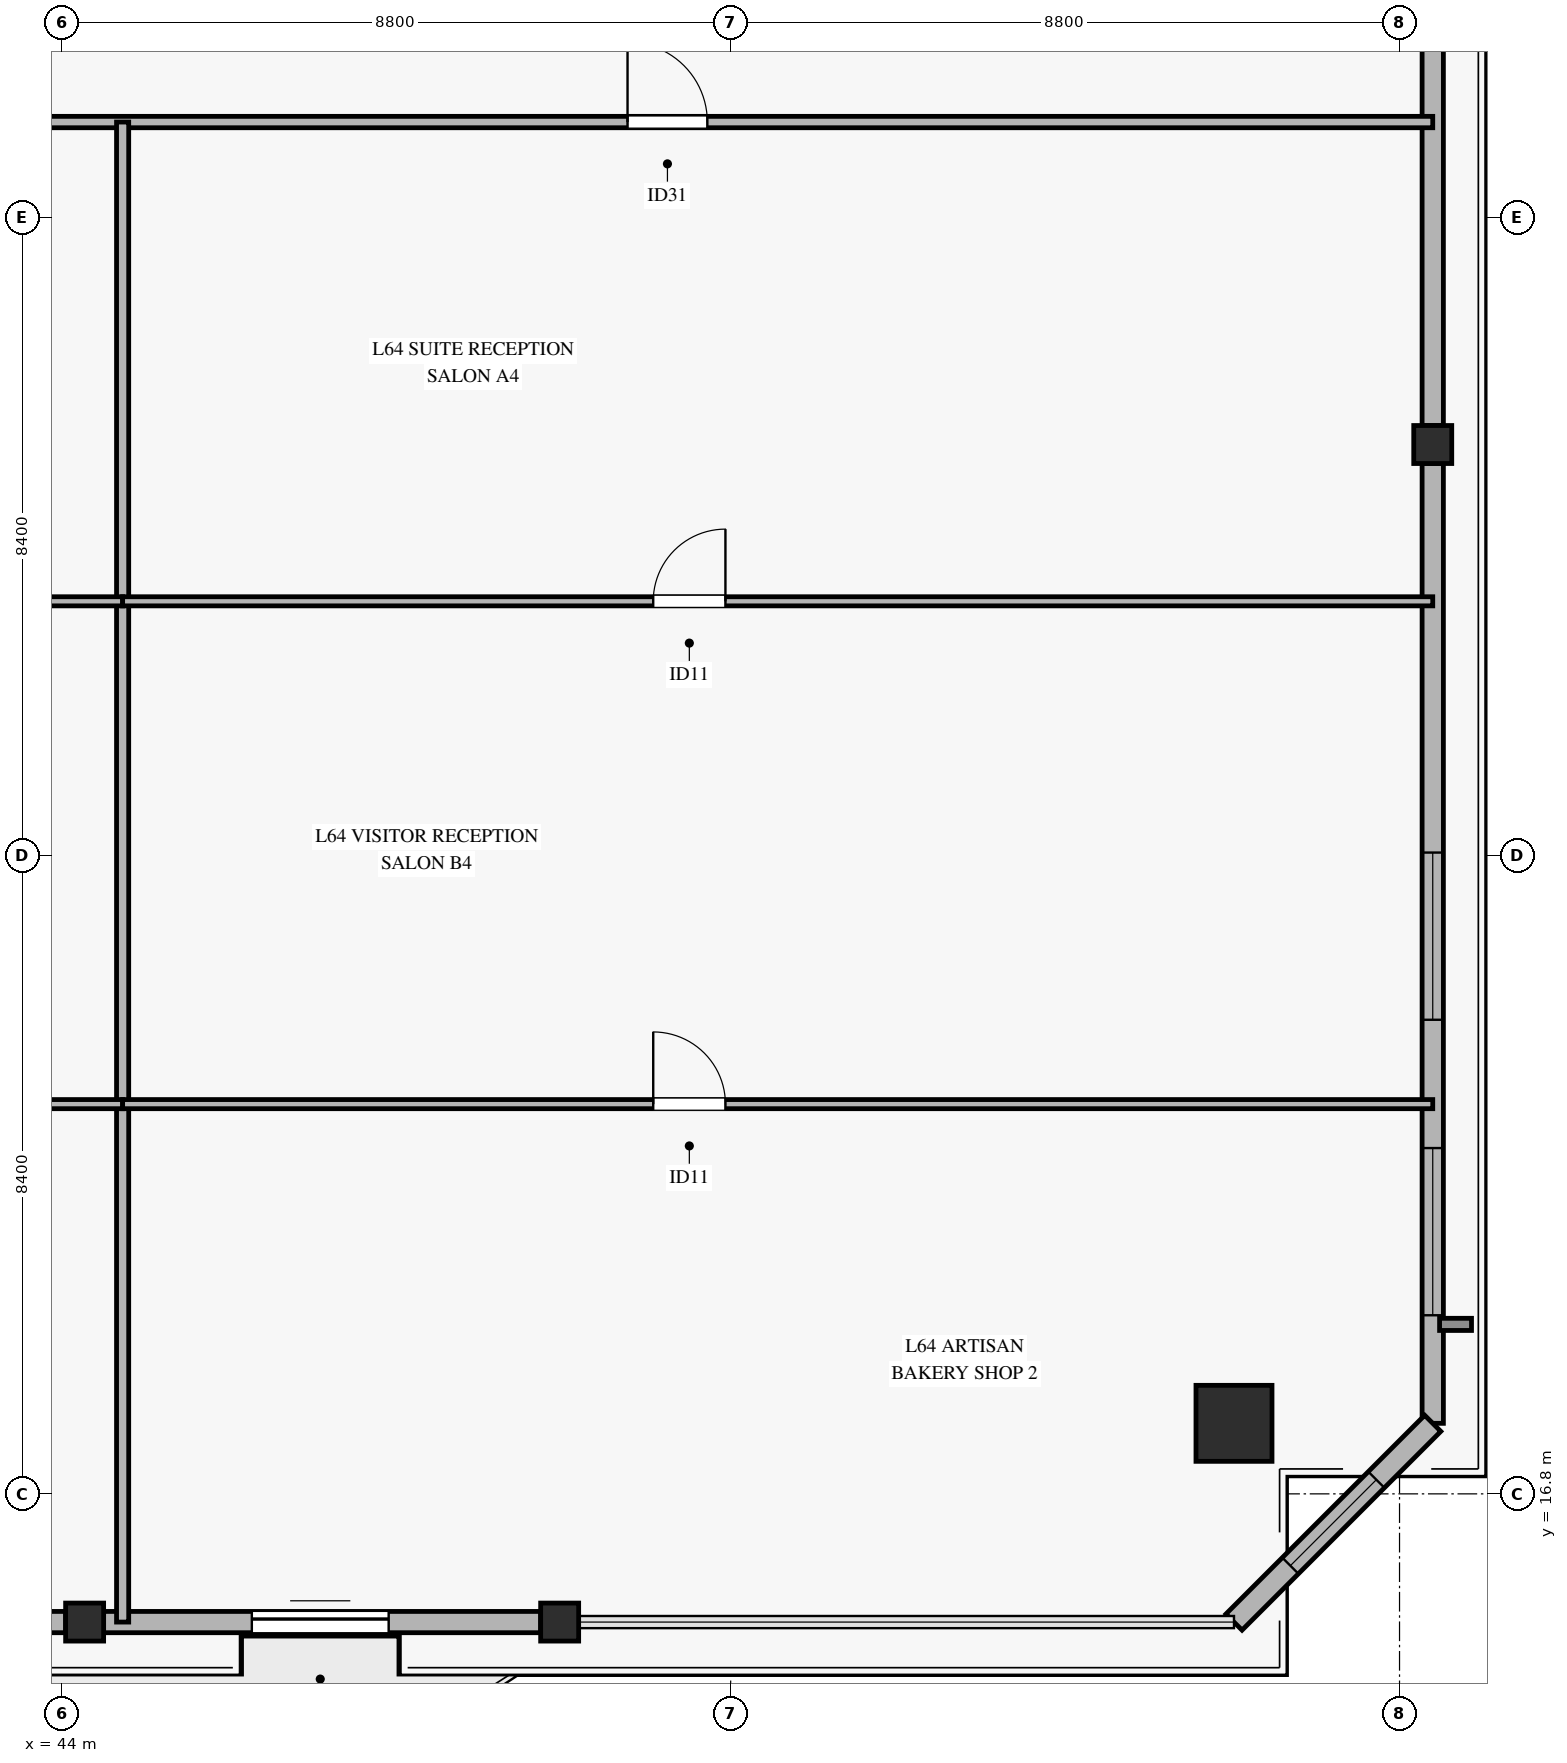
"""IFC4 building model, lengths in metres.
Left out: names, types, materials, properties, quantities, classifications, styles, units other than length and angle.
Written with IfcOpenShell. Run it as: python <this file> out.ifc"""

import sys

from ifc_helpers import new_model, si_unit, direction, frame, frame_2d, origin, origin_2d, place, context, subcontext, project, spatial, rectangle, hollow_rectangle, extrude, source, transform, mapped, element, fill, save


model = new_model("IFC4")
c1 = context("Model", 3, precision=1e-05, world=origin(), true_north=direction((0.0, 1.0)))
c2 = subcontext(c1, "Body", "Model", "MODEL_VIEW")
j1 = project(units=[si_unit("LENGTHUNIT", "METRE"), si_unit("PLANEANGLEUNIT", "RADIAN")], contexts=[c1])
p1 = place(None, origin())
s1 = spatial("IfcSite", under=j1, at=p1, CompositionType="ELEMENT")
p2 = place(p1, origin())
s2 = spatial("IfcBuilding", under=s1, at=p2, CompositionType="ELEMENT")
p3 = place(p2, frame((0.0, 0.0, 251.9)))
s3 = spatial("IfcBuildingStorey", under=s2, at=p3, CompositionType="ELEMENT", Elevation=251.9)
m1 = source(origin(), c2, "Body", "SweptSolid", [
    extrude(hollow_rectangle(XDim=1.0, YDim=1.0, WallThickness=0.045, at=origin_2d()), origin(), (0.0, 0.0, 1.0), 3.185),
])
p4 = place(p3, frame((59.422, 17.728, 0.0), z_axis=(0.0, 0.0, 1.0), x_axis=(1.0, 0.0, 0.0)))
e1 = element("IfcColumn", 1, at=p4, inside=s3, PredefinedType="COLUMN", context=c2, shape_type="MappedRepresentation", body=[
    mapped(m1, transform((0.0, 0.0, 0.0), x_axis=(1.0, 0.0, 0.0), y_axis=(0.0, 1.0, 0.0), z_axis=(0.0, 0.0, 1.0), scale=1.0)),
])
m2 = source(origin(), c2, "Body", "SweptSolid", [
    extrude(hollow_rectangle(XDim=0.5, YDim=0.5, WallThickness=0.024, at=origin_2d()), origin(), (0.0, 0.0, 1.0), 3.185),
])
for number, where, z_axis, x_axis in (
    (2, (44.3, 15.113, 0.0), (0.0, 0.0, 1.0), (1.0, 0.0, 0.0)),
    (3, (50.55, 15.113, 0.0), (0.0, 0.0, 1.0), (1.0, 0.0, 0.0)),
    (4, (62.037, 30.607, 0.0), (0.0, 0.0, 1.0), (1.0, 0.0, 0.0)),
):
    element("IfcColumn", number, at=place(p3, frame(where, z_axis=z_axis, x_axis=x_axis)), inside=s3, PredefinedType="COLUMN", context=c2, shape_type="MappedRepresentation", body=[
        mapped(m2, transform((0.0, 0.0, 0.0), x_axis=(1.0, 0.0, 0.0), y_axis=(0.0, 1.0, 0.0), z_axis=(0.0, 0.0, 1.0), scale=1.0)),
    ])
p5 = place(p3, frame((37.8, 15.113, 0.0), z_axis=(0.0, 0.0, 1.0), x_axis=(1.0, 0.0, 0.0)))
e5 = element("IfcWall", 5, at=p5, inside=s3, PredefinedType="SOLIDWALL", context=c2, shape_type="SweptSolid", body=[
    extrude(rectangle(XDim=6.25, YDim=0.28, at=frame_2d((3.125, 0.0))), origin(), (0.0, 0.0, 1.0), 2.815),
])
p6 = place(p3, frame((44.55, 15.113, 0.0), z_axis=(0.0, 0.0, 1.0), x_axis=(1.0, 0.0, 0.0)))
e6 = element("IfcWall", 6, at=p6, inside=s3, PredefinedType="SOLIDWALL", context=c2, shape_type="SweptSolid", body=[
    extrude(rectangle(XDim=5.75, YDim=0.28, at=frame_2d((2.875, 0.0))), origin(), (0.0, 0.0, 1.0), 2.815),
])
p7 = place(p6, frame((1.95, 0.0, 0.0)))
e7 = element("IfcOpeningElement", 7, at=p7, cuts=e6, PredefinedType="OPENING", context=c2, shape_type="SweptSolid", body=[
    extrude(rectangle(XDim=1.8, YDim=2.25, at=frame_2d((0.9, 1.125))), frame((0.0, 0.15, 0.0), z_axis=(0.0, -1.0, 0.0), x_axis=(1.0, 0.0, 0.0)), (0.0, 0.0, 1.0), 0.3),
])
p8 = place(p3, frame((62.037, 17.728, 0.0), z_axis=(0.0, 0.0, 1.0), x_axis=(0.0, 1.0, 0.0)))
e8 = element("IfcWall", 8, at=p8, inside=s3, PredefinedType="SOLIDWALL", context=c2, shape_type="SweptSolid", body=[
    extrude(rectangle(XDim=12.629, YDim=0.28, at=frame_2d((6.314, 0.0))), origin(), (0.0, 0.0, 1.0), 2.815),
])
p9 = place(p8, frame((1.422, 0.0, 0.45)))
e9 = element("IfcOpeningElement", 9, at=p9, cuts=e8, PredefinedType="OPENING", context=c2, shape_type="SweptSolid", body=[
    extrude(rectangle(XDim=2.2, YDim=2.1, at=frame_2d((1.1, 1.05))), frame((0.0, 0.15, 0.0), z_axis=(0.0, -1.0, 0.0), x_axis=(1.0, 0.0, 0.0)), (0.0, 0.0, 1.0), 0.3),
])
p10 = place(p8, frame((5.31, 0.0, 0.45)))
e10 = element("IfcOpeningElement", 10, at=p10, cuts=e8, PredefinedType="OPENING", context=c2, shape_type="SweptSolid", body=[
    extrude(rectangle(XDim=2.2, YDim=2.1, at=frame_2d((1.1, 1.05))), frame((0.0, 0.15, 0.0), z_axis=(0.0, -1.0, 0.0), x_axis=(1.0, 0.0, 0.0)), (0.0, 0.0, 1.0), 0.3),
])
p11 = place(p3, frame((62.037, 30.857, 0.0), z_axis=(0.0, 0.0, 1.0), x_axis=(0.0, 1.0, 0.0)))
e11 = element("IfcWall", 11, at=p11, inside=s3, PredefinedType="SOLIDWALL", context=c2, shape_type="SweptSolid", body=[
    extrude(rectangle(XDim=12.628, YDim=0.28, at=frame_2d((6.314, 0.0))), origin(), (0.0, 0.0, 1.0), 2.815),
])
p12 = place(p11, frame((7.583, 0.0, 0.45)))
e12 = element("IfcOpeningElement", 12, at=p12, cuts=e11, PredefinedType="OPENING", context=c2, shape_type="SweptSolid", body=[
    extrude(rectangle(XDim=2.2, YDim=2.1, at=frame_2d((1.1, 1.05))), frame((0.0, 0.15, 0.0), z_axis=(0.0, -1.0, 0.0), x_axis=(1.0, 0.0, 0.0)), (0.0, 0.0, 1.0), 0.3),
])
p13 = place(p3, frame((59.422, 15.113, 0.0), z_axis=(0.0, 0.0, 1.0), x_axis=(0.707106781187, 0.707106781187, 0.0)))
e13 = element("IfcWall", 13, at=p13, inside=s3, PredefinedType="SOLIDWALL", context=c2, shape_type="SweptSolid", body=[
    extrude(rectangle(XDim=3.698, YDim=0.3, at=frame_2d((1.849, 0.0))), origin(), (0.0, 0.0, 1.0), 2.815),
])
p14 = place(p13, frame((1.049, 0.0, 0.45)))
e14 = element("IfcOpeningElement", 14, at=p14, cuts=e13, PredefinedType="OPENING", context=c2, shape_type="SweptSolid", body=[
    extrude(rectangle(XDim=1.6, YDim=2.0, at=frame_2d((0.8, 1.0))), frame((0.0, 0.16, 0.0), z_axis=(0.0, -1.0, 0.0), x_axis=(1.0, 0.0, 0.0)), (0.0, 0.0, 1.0), 0.32),
])
p15 = place(p3, frame((8.364, 34.85, 0.0), z_axis=(0.0, 0.0, 1.0), x_axis=(1.0, 0.0, 0.0)))
e15 = element("IfcWall", 15, at=p15, inside=s3, PredefinedType="PARTITIONING", context=c2, shape_type="SweptSolid", body=[
    extrude(rectangle(XDim=53.673, YDim=0.15, at=frame_2d((26.836, 0.0))), origin(), (0.0, 0.0, 1.0), 2.47),
])
p16 = place(p15, frame((5.095, 0.0, 0.0)))
e16 = element("IfcOpeningElement", 16, at=p16, cuts=e15, PredefinedType="OPENING", context=c2, shape_type="SweptSolid", body=[
    extrude(rectangle(XDim=1.05, YDim=2.15, at=frame_2d((0.525, 1.075))), frame((0.0, 0.085, 0.0), z_axis=(0.0, -1.0, 0.0), x_axis=(1.0, 0.0, 0.0)), (0.0, 0.0, 1.0), 0.17),
])
p17 = place(p15, frame((17.517, 0.0, 0.0)))
e17 = element("IfcOpeningElement", 17, at=p17, cuts=e15, PredefinedType="OPENING", context=c2, shape_type="SweptSolid", body=[
    extrude(rectangle(XDim=1.05, YDim=2.15, at=frame_2d((0.525, 1.075))), frame((0.0, 0.085, 0.0), z_axis=(0.0, -1.0, 0.0), x_axis=(1.0, 0.0, 0.0)), (0.0, 0.0, 1.0), 0.17),
])
p18 = place(p15, frame((29.537, 0.0, 0.0)))
e18 = element("IfcOpeningElement", 18, at=p18, cuts=e15, PredefinedType="OPENING", context=c2, shape_type="SweptSolid", body=[
    extrude(rectangle(XDim=1.05, YDim=2.15, at=frame_2d((0.525, 1.075))), frame((0.0, 0.085, 0.0), z_axis=(0.0, -1.0, 0.0), x_axis=(1.0, 0.0, 0.0)), (0.0, 0.0, 1.0), 0.17),
])
p19 = place(p15, frame((43.079, 0.0, 0.0)))
e19 = element("IfcOpeningElement", 19, at=p19, cuts=e15, PredefinedType="OPENING", context=c2, shape_type="SweptSolid", body=[
    extrude(rectangle(XDim=1.05, YDim=2.15, at=frame_2d((0.525, 1.075))), frame((0.0, 0.085, 0.0), z_axis=(0.0, -1.0, 0.0), x_axis=(1.0, 0.0, 0.0)), (0.0, 0.0, 1.0), 0.17),
])
p20 = place(p3, frame((44.8, 15.113, 0.0), z_axis=(0.0, 0.0, 1.0), x_axis=(0.0, 1.0, 0.0)))
e20 = element("IfcWall", 20, at=p20, inside=s3, PredefinedType="PARTITIONING", context=c2, shape_type="SweptSolid", body=[
    extrude(rectangle(XDim=19.737, YDim=0.16, at=frame_2d((9.869, 0.0))), origin(), (0.0, 0.0, 1.0), 2.77),
])
p21 = place(p3, frame((33.4, 21.928, 0.0), z_axis=(0.0, 0.0, 1.0), x_axis=(1.0, 0.0, 0.0)))
e21 = element("IfcWall", 21, at=p21, inside=s3, PredefinedType="PARTITIONING", context=c2, shape_type="SweptSolid", body=[
    extrude(rectangle(XDim=11.4, YDim=0.12, at=frame_2d((5.7, 0.0))), origin(), (0.0, 0.0, 1.0), 2.47),
])
p22 = place(p21, frame((4.726, 0.0, 0.0)))
e22 = element("IfcOpeningElement", 22, at=p22, cuts=e21, PredefinedType="OPENING", context=c2, shape_type="SweptSolid", body=[
    extrude(rectangle(XDim=0.95, YDim=2.1, at=frame_2d((0.475, 1.05))), frame((0.0, 0.07, 0.0), z_axis=(0.0, -1.0, 0.0), x_axis=(1.0, 0.0, 0.0)), (0.0, 0.0, 1.0), 0.14),
])
p23 = place(p3, frame((33.4, 28.544, 0.0), z_axis=(0.0, 0.0, 1.0), x_axis=(1.0, 0.0, 0.0)))
e23 = element("IfcWall", 23, at=p23, inside=s3, PredefinedType="PARTITIONING", context=c2, shape_type="SweptSolid", body=[
    extrude(rectangle(XDim=11.4, YDim=0.12, at=frame_2d((5.7, 0.0))), origin(), (0.0, 0.0, 1.0), 2.47),
])
p24 = place(p23, frame((4.726, 0.0, 0.0)))
e24 = element("IfcOpeningElement", 24, at=p24, cuts=e23, PredefinedType="OPENING", context=c2, shape_type="SweptSolid", body=[
    extrude(rectangle(XDim=0.95, YDim=2.1, at=frame_2d((0.475, 1.05))), frame((0.0, 0.07, 0.0), z_axis=(0.0, -1.0, 0.0), x_axis=(1.0, 0.0, 0.0)), (0.0, 0.0, 1.0), 0.14),
])
p25 = place(p3, frame((44.8, 21.928, 0.0), z_axis=(0.0, 0.0, 1.0), x_axis=(1.0, 0.0, 0.0)))
e25 = element("IfcWall", 25, at=p25, inside=s3, PredefinedType="PARTITIONING", context=c2, shape_type="SweptSolid", body=[
    extrude(rectangle(XDim=17.237, YDim=0.12, at=frame_2d((8.619, 0.0))), origin(), (0.0, 0.0, 1.0), 2.47),
])
p26 = place(p25, frame((6.981, 0.0, 0.0)))
e26 = element("IfcOpeningElement", 26, at=p26, cuts=e25, PredefinedType="OPENING", context=c2, shape_type="SweptSolid", body=[
    extrude(rectangle(XDim=0.95, YDim=2.1, at=frame_2d((0.475, 1.05))), frame((0.0, 0.07, 0.0), z_axis=(0.0, -1.0, 0.0), x_axis=(1.0, 0.0, 0.0)), (0.0, 0.0, 1.0), 0.14),
])
p27 = place(p3, frame((44.8, 28.544, 0.0), z_axis=(0.0, 0.0, 1.0), x_axis=(1.0, 0.0, 0.0)))
e27 = element("IfcWall", 27, at=p27, inside=s3, PredefinedType="PARTITIONING", context=c2, shape_type="SweptSolid", body=[
    extrude(rectangle(XDim=17.237, YDim=0.12, at=frame_2d((8.619, 0.0))), origin(), (0.0, 0.0, 1.0), 2.47),
])
p28 = place(p27, frame((6.981, 0.0, 0.0)))
e28 = element("IfcOpeningElement", 28, at=p28, cuts=e27, PredefinedType="OPENING", context=c2, shape_type="SweptSolid", body=[
    extrude(rectangle(XDim=0.95, YDim=2.1, at=frame_2d((0.475, 1.05))), frame((0.0, 0.07, 0.0), z_axis=(0.0, -1.0, 0.0), x_axis=(1.0, 0.0, 0.0)), (0.0, 0.0, 1.0), 0.14),
])
m3 = source(origin(), c2, "Body", "SweptSolid", [
    extrude(rectangle(XDim=1.8, YDim=2.25, at=frame_2d((0.9, 1.125))), frame((0.0, 0.025, 0.0), z_axis=(0.0, -1.0, 0.0), x_axis=(1.0, 0.0, 0.0)), (0.0, 0.0, 1.0), 0.05),
])
p29 = place(p7, origin())
e29 = element("IfcDoor", 29, at=p29, inside=s3, OperationType="SLIDING_TO_LEFT", PredefinedType="DOOR", context=c2, shape_type="MappedRepresentation", body=[
    mapped(m3, transform((0.0, 0.0, 0.0), x_axis=(1.0, 0.0, 0.0), y_axis=(0.0, 1.0, 0.0), z_axis=(0.0, 0.0, 1.0), scale=1.0)),
])
fill(e7, e29)
m4 = source(origin(), c2, "Body", "SweptSolid", [
    extrude(rectangle(XDim=2.2, YDim=2.1, at=frame_2d((1.1, 1.05))), frame((0.0, 0.03, 0.0), z_axis=(0.0, -1.0, 0.0), x_axis=(1.0, 0.0, 0.0)), (0.0, 0.0, 1.0), 0.06),
])
p30 = place(p9, origin())
e30 = element("IfcWindow", 30, at=p30, inside=s3, PartitioningType="SINGLE_PANEL", PredefinedType="WINDOW", context=c2, shape_type="MappedRepresentation", body=[
    mapped(m4, transform((0.0, 0.0, 0.0), x_axis=(1.0, 0.0, 0.0), y_axis=(0.0, 1.0, 0.0), z_axis=(0.0, 0.0, 1.0), scale=1.0)),
])
fill(e9, e30)
p31 = place(p10, origin())
e31 = element("IfcWindow", 31, at=p31, inside=s3, PartitioningType="SINGLE_PANEL", PredefinedType="WINDOW", context=c2, shape_type="MappedRepresentation", body=[
    mapped(m4, transform((0.0, 0.0, 0.0), x_axis=(1.0, 0.0, 0.0), y_axis=(0.0, 1.0, 0.0), z_axis=(0.0, 0.0, 1.0), scale=1.0)),
])
fill(e10, e31)
m5 = source(origin(), c2, "Body", "SweptSolid", [
    extrude(rectangle(XDim=1.6, YDim=2.0, at=frame_2d((0.8, 1.0))), frame((0.0, 0.03, 0.0), z_axis=(0.0, -1.0, 0.0), x_axis=(1.0, 0.0, 0.0)), (0.0, 0.0, 1.0), 0.06),
])
p32 = place(p14, origin())
e32 = element("IfcWindow", 32, at=p32, inside=s3, PartitioningType="SINGLE_PANEL", PredefinedType="WINDOW", context=c2, shape_type="MappedRepresentation", body=[
    mapped(m5, transform((0.0, 0.0, 0.0), x_axis=(1.0, 0.0, 0.0), y_axis=(0.0, 1.0, 0.0), z_axis=(0.0, 0.0, 1.0), scale=1.0)),
])
fill(e14, e32)
m6 = source(origin(), c2, "Body", "SweptSolid", [
    extrude(rectangle(XDim=1.05, YDim=2.15, at=frame_2d((0.525, 1.075))), frame((0.0, 0.025, 0.0), z_axis=(0.0, -1.0, 0.0), x_axis=(1.0, 0.0, 0.0)), (0.0, 0.0, 1.0), 0.05),
])
p33 = place(p19, origin())
e33 = element("IfcDoor", 33, at=p33, inside=s3, OperationType="SINGLE_SWING_LEFT", PredefinedType="DOOR", context=c2, shape_type="MappedRepresentation", body=[
    mapped(m6, transform((0.0, 0.0, 0.0), x_axis=(1.0, 0.0, 0.0), y_axis=(0.0, 1.0, 0.0), z_axis=(0.0, 0.0, 1.0), scale=1.0)),
])
fill(e19, e33)
m7 = source(origin(), c2, "Body", "SweptSolid", [
    extrude(rectangle(XDim=0.95, YDim=2.1, at=frame_2d((0.475, 1.05))), frame((0.0, 0.025, 0.0), z_axis=(0.0, -1.0, 0.0), x_axis=(1.0, 0.0, 0.0)), (0.0, 0.0, 1.0), 0.05),
])
p34 = place(p28, origin())
e34 = element("IfcDoor", 34, at=p34, inside=s3, OperationType="SINGLE_SWING_RIGHT", PredefinedType="DOOR", context=c2, shape_type="MappedRepresentation", body=[
    mapped(m7, transform((0.0, 0.0, 0.0), x_axis=(1.0, 0.0, 0.0), y_axis=(0.0, 1.0, 0.0), z_axis=(0.0, 0.0, 1.0), scale=1.0)),
])
fill(e28, e34)
p35 = place(p26, origin())
e35 = element("IfcDoor", 35, at=p35, inside=s3, OperationType="SINGLE_SWING_LEFT", PredefinedType="DOOR", context=c2, shape_type="MappedRepresentation", body=[
    mapped(m7, transform((0.0, 0.0, 0.0), x_axis=(1.0, 0.0, 0.0), y_axis=(0.0, 1.0, 0.0), z_axis=(0.0, 0.0, 1.0), scale=1.0)),
])
fill(e26, e35)
save(model, sys.argv[1])
